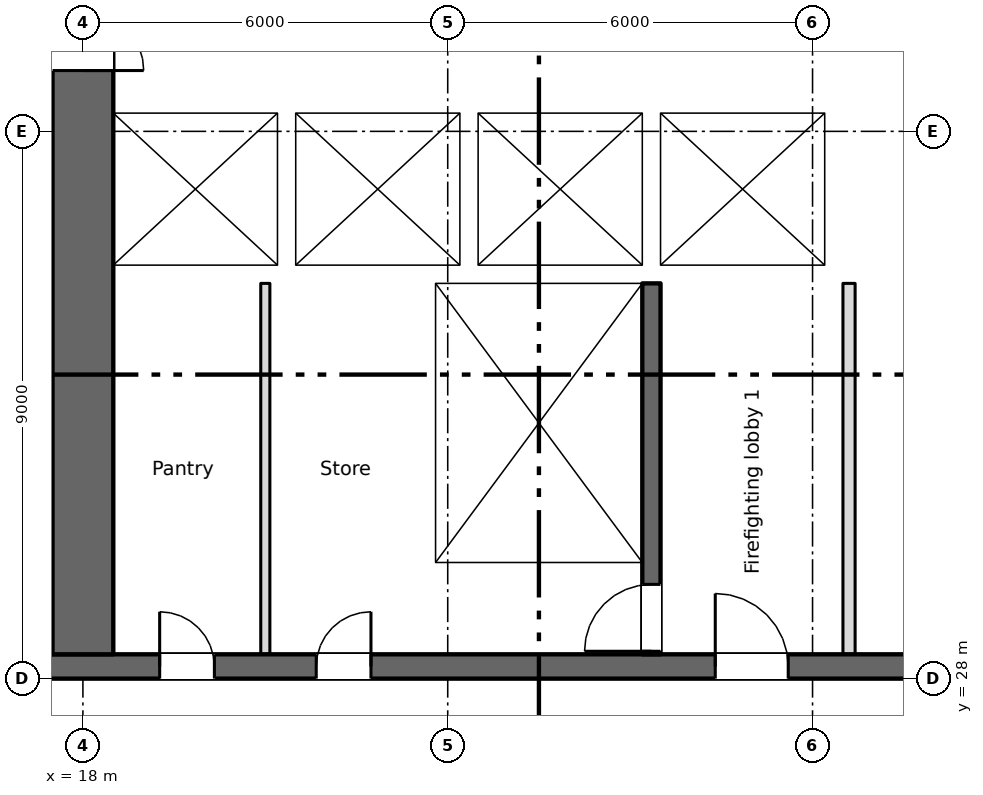
"""IFC4 building model, lengths in metres.
Left out: names, types, materials, properties, quantities, classifications, styles, units other than length and angle.
Written with IfcOpenShell. Run it as: python <this file> out.ifc"""

import sys

from ifc_helpers import new_model, si_unit, direction, frame, frame_2d, origin, place, context, subcontext, project, spatial, rectangle, extrude, element, fill, save


model = new_model("IFC4")
c1 = context("Model", 3, precision=1e-05, world=origin(), true_north=direction((0.0, 1.0)))
c2 = subcontext(c1, "Body", "Model", "MODEL_VIEW")
j1 = project(units=[si_unit("LENGTHUNIT", "METRE"), si_unit("PLANEANGLEUNIT", "RADIAN")], contexts=[c1])
p1 = place(None, origin())
s1 = spatial("IfcSite", under=j1, at=p1, CompositionType="ELEMENT")
p2 = place(p1, origin())
s2 = spatial("IfcBuilding", under=s1, at=p2, CompositionType="ELEMENT")
p3 = place(p2, frame((0.0, 0.0, 22.5)))
s3 = spatial("IfcBuildingStorey", under=s2, at=p3, CompositionType="ELEMENT", Elevation=22.5)
p4 = place(p3, frame((6.7, 28.2, 0.0), z_axis=(0.0, 0.0, 1.0), x_axis=(1.0, 0.0, 0.0)))
e1 = element("IfcWall", 1, at=p4, inside=s3, PredefinedType="SHEAR", context=c2, shape_type="SweptSolid", body=[
    extrude(rectangle(XDim=57.8, YDim=0.4, at=frame_2d((28.9, 0.0))), origin(), (0.0, 0.0, 1.0), 3.35),
])
p5 = place(p4, frame((12.562, 0.0, 0.0)))
e2 = element("IfcOpeningElement", 2, at=p5, cuts=e1, PredefinedType="OPENING", context=c2, shape_type="SweptSolid", body=[
    extrude(rectangle(XDim=0.9, YDim=2.1, at=frame_2d((0.45, 1.05))), frame((0.0, 0.21, 0.0), z_axis=(0.0, -1.0, 0.0), x_axis=(1.0, 0.0, 0.0)), (0.0, 0.0, 1.0), 0.42),
])
p6 = place(p4, frame((15.137, 0.0, 0.0)))
e3 = element("IfcOpeningElement", 3, at=p6, cuts=e1, PredefinedType="OPENING", context=c2, shape_type="SweptSolid", body=[
    extrude(rectangle(XDim=0.9, YDim=2.1, at=frame_2d((0.45, 1.05))), frame((0.0, 0.21, 0.0), z_axis=(0.0, -1.0, 0.0), x_axis=(1.0, 0.0, 0.0)), (0.0, 0.0, 1.0), 0.42),
])
p7 = place(p4, frame((49.85, 0.0, 0.0)))
e4 = element("IfcOpeningElement", 4, at=p7, cuts=e1, PredefinedType="OPENING", context=c2, shape_type="SweptSolid", body=[
    extrude(rectangle(XDim=0.9, YDim=2.1, at=frame_2d((0.45, 1.05))), frame((0.0, 0.21, 0.0), z_axis=(0.0, -1.0, 0.0), x_axis=(1.0, 0.0, 0.0)), (0.0, 0.0, 1.0), 0.42),
])
p8 = place(p4, frame((0.562, 0.0, 0.0)))
e5 = element("IfcOpeningElement", 5, at=p8, cuts=e1, PredefinedType="OPENING", context=c2, shape_type="SweptSolid", body=[
    extrude(rectangle(XDim=0.9, YDim=2.1, at=frame_2d((0.45, 1.05))), frame((0.0, 0.21, 0.0), z_axis=(0.0, -1.0, 0.0), x_axis=(1.0, 0.0, 0.0)), (0.0, 0.0, 1.0), 0.42),
])
p9 = place(p4, frame((2.137, 0.0, 0.0)))
e6 = element("IfcOpeningElement", 6, at=p9, cuts=e1, PredefinedType="OPENING", context=c2, shape_type="SweptSolid", body=[
    extrude(rectangle(XDim=0.9, YDim=2.1, at=frame_2d((0.45, 1.05))), frame((0.0, 0.21, 0.0), z_axis=(0.0, -1.0, 0.0), x_axis=(1.0, 0.0, 0.0)), (0.0, 0.0, 1.0), 0.42),
])
p10 = place(p4, frame((4.7, 0.0, 0.0)))
e7 = element("IfcOpeningElement", 7, at=p10, cuts=e1, PredefinedType="OPENING", context=c2, shape_type="SweptSolid", body=[
    extrude(rectangle(XDim=1.2, YDim=2.1, at=frame_2d((0.6, 1.05))), frame((0.0, 0.21, 0.0), z_axis=(0.0, -1.0, 0.0), x_axis=(1.0, 0.0, 0.0)), (0.0, 0.0, 1.0), 0.42),
])
p11 = place(p4, frame((31.7, 0.0, 0.0)))
e8 = element("IfcOpeningElement", 8, at=p11, cuts=e1, PredefinedType="OPENING", context=c2, shape_type="SweptSolid", body=[
    extrude(rectangle(XDim=1.2, YDim=2.1, at=frame_2d((0.6, 1.05))), frame((0.0, 0.21, 0.0), z_axis=(0.0, -1.0, 0.0), x_axis=(1.0, 0.0, 0.0)), (0.0, 0.0, 1.0), 0.42),
])
p12 = place(p4, frame((55.2, 0.0, 0.0)))
e9 = element("IfcOpeningElement", 9, at=p12, cuts=e1, PredefinedType="OPENING", context=c2, shape_type="SweptSolid", body=[
    extrude(rectangle(XDim=1.2, YDim=2.1, at=frame_2d((0.6, 1.05))), frame((0.0, 0.21, 0.0), z_axis=(0.0, -1.0, 0.0), x_axis=(1.0, 0.0, 0.0)), (0.0, 0.0, 1.0), 0.42),
])
p13 = place(p4, frame((21.7, 0.0, 0.0)))
e10 = element("IfcOpeningElement", 10, at=p13, cuts=e1, PredefinedType="OPENING", context=c2, shape_type="SweptSolid", body=[
    extrude(rectangle(XDim=1.2, YDim=2.1, at=frame_2d((0.6, 1.05))), frame((0.0, 0.21, 0.0), z_axis=(0.0, -1.0, 0.0), x_axis=(1.0, 0.0, 0.0)), (0.0, 0.0, 1.0), 0.42),
])
p14 = place(p4, frame((41.7, 0.0, 0.0)))
e11 = element("IfcOpeningElement", 11, at=p14, cuts=e1, PredefinedType="OPENING", context=c2, shape_type="SweptSolid", body=[
    extrude(rectangle(XDim=1.2, YDim=2.1, at=frame_2d((0.6, 1.05))), frame((0.0, 0.21, 0.0), z_axis=(0.0, -1.0, 0.0), x_axis=(1.0, 0.0, 0.0)), (0.0, 0.0, 1.0), 0.42),
])
p15 = place(p4, frame((24.85, 0.0, 0.0)))
e12 = element("IfcOpeningElement", 12, at=p15, cuts=e1, PredefinedType="OPENING", context=c2, shape_type="SweptSolid", body=[
    extrude(rectangle(XDim=2.4, YDim=2.1, at=frame_2d((1.2, 1.05))), frame((0.0, 0.21, 0.0), z_axis=(0.0, -1.0, 0.0), x_axis=(1.0, 0.0, 0.0)), (0.0, 0.0, 1.0), 0.42),
])
p16 = place(p4, frame((37.35, 0.0, 0.0)))
e13 = element("IfcOpeningElement", 13, at=p16, cuts=e1, PredefinedType="OPENING", context=c2, shape_type="SweptSolid", body=[
    extrude(rectangle(XDim=2.4, YDim=2.1, at=frame_2d((1.2, 1.05))), frame((0.0, 0.21, 0.0), z_axis=(0.0, -1.0, 0.0), x_axis=(1.0, 0.0, 0.0)), (0.0, 0.0, 1.0), 0.42),
])
p17 = place(p4, frame((7.85, 0.0, 0.0)))
e14 = element("IfcOpeningElement", 14, at=p17, cuts=e1, PredefinedType="OPENING", context=c2, shape_type="SweptSolid", body=[
    extrude(rectangle(XDim=2.4, YDim=2.1, at=frame_2d((1.2, 1.05))), frame((0.0, 0.21, 0.0), z_axis=(0.0, -1.0, 0.0), x_axis=(1.0, 0.0, 0.0)), (0.0, 0.0, 1.0), 0.42),
])
p18 = place(p4, frame((28.85, 0.0, 0.0)))
e15 = element("IfcOpeningElement", 15, at=p18, cuts=e1, PredefinedType="OPENING", context=c2, shape_type="SweptSolid", body=[
    extrude(rectangle(XDim=0.9, YDim=2.1, at=frame_2d((0.45, 1.05))), frame((0.0, 0.21, 0.0), z_axis=(0.0, -1.0, 0.0), x_axis=(1.0, 0.0, 0.0)), (0.0, 0.0, 1.0), 0.42),
])
p19 = place(p4, frame((34.85, 0.0, 0.0)))
e16 = element("IfcOpeningElement", 16, at=p19, cuts=e1, PredefinedType="OPENING", context=c2, shape_type="SweptSolid", body=[
    extrude(rectangle(XDim=0.9, YDim=2.1, at=frame_2d((0.45, 1.05))), frame((0.0, 0.21, 0.0), z_axis=(0.0, -1.0, 0.0), x_axis=(1.0, 0.0, 0.0)), (0.0, 0.0, 1.0), 0.42),
])
p20 = place(p3, frame((18.0, 28.4, 0.0), z_axis=(0.0, 0.0, 1.0), x_axis=(0.0, 1.0, 0.0)))
e17 = element("IfcWall", 17, at=p20, inside=s3, PredefinedType="SHEAR", context=c2, shape_type="SweptSolid", body=[
    extrude(rectangle(XDim=16.6, YDim=1.0, at=frame_2d((8.3, 0.0))), origin(), (0.0, 0.0, 1.0), 3.35),
])
p21 = place(p20, frame((9.6, 0.0, 0.0)))
e18 = element("IfcOpeningElement", 18, at=p21, cuts=e17, PredefinedType="OPENING", context=c2, shape_type="SweptSolid", body=[
    extrude(rectangle(XDim=2.0, YDim=2.1, at=frame_2d((1.0, 1.05))), frame((0.0, 0.51, 0.0), z_axis=(0.0, -1.0, 0.0), x_axis=(1.0, 0.0, 0.0)), (0.0, 0.0, 1.0), 1.02),
])
p22 = place(p20, frame((15.25, 0.0, 0.0)))
e19 = element("IfcOpeningElement", 19, at=p22, cuts=e17, PredefinedType="OPENING", context=c2, shape_type="SweptSolid", body=[
    extrude(rectangle(XDim=1.2, YDim=2.1, at=frame_2d((0.6, 1.05))), frame((0.0, 0.51, 0.0), z_axis=(0.0, -1.0, 0.0), x_axis=(1.0, 0.0, 0.0)), (0.0, 0.0, 1.0), 1.02),
])
p23 = place(p3, frame((23.65, 28.4, 0.0), z_axis=(0.0, 0.0, 1.0), x_axis=(0.0, 1.0, 0.0)))
e20 = element("IfcWall", 20, at=p23, inside=s3, PredefinedType="SHEAR", context=c2, shape_type="SweptSolid", body=[
    extrude(rectangle(XDim=6.1, YDim=0.3, at=frame_2d((3.05, 0.0))), origin(), (0.0, 0.0, 1.0), 3.35),
])
p24 = place(p3, frame((27.35, 28.4, 0.0), z_axis=(0.0, 0.0, 1.0), x_axis=(0.0, 1.0, 0.0)))
e21 = element("IfcWall", 21, at=p24, inside=s3, PredefinedType="SHEAR", context=c2, shape_type="SweptSolid", body=[
    extrude(rectangle(XDim=6.1, YDim=0.3, at=frame_2d((3.05, 0.0))), origin(), (0.0, 0.0, 1.0), 3.35),
])
p25 = place(p24, frame((0.05, 0.0, 0.0)))
e22 = element("IfcOpeningElement", 22, at=p25, cuts=e21, PredefinedType="OPENING", context=c2, shape_type="SweptSolid", body=[
    extrude(rectangle(XDim=1.1, YDim=2.1, at=frame_2d((0.55, 1.05))), frame((0.0, 0.16, 0.0), z_axis=(0.0, -1.0, 0.0), x_axis=(1.0, 0.0, 0.0)), (0.0, 0.0, 1.0), 0.32),
])
p26 = place(p3, frame((18.5, 34.65, 0.0), z_axis=(0.0, 0.0, 1.0), x_axis=(1.0, 0.0, 0.0)))
e23 = element("IfcWall", 23, at=p26, inside=s3, PredefinedType="SHEAR", context=c2, shape_type="SweptSolid", body=[
    extrude(rectangle(XDim=12.2, YDim=0.3, at=frame_2d((6.1, 0.0))), origin(), (0.0, 0.0, 1.0), 3.35),
])
p27 = place(p26, frame((9.8, 0.0, 0.0)))
e24 = element("IfcOpeningElement", 24, at=p27, cuts=e23, PredefinedType="OPENING", context=c2, shape_type="SweptSolid", body=[
    extrude(rectangle(XDim=1.1, YDim=2.1, at=frame_2d((0.55, 1.05))), frame((0.0, 0.16, 0.0), z_axis=(0.0, -1.0, 0.0), x_axis=(1.0, 0.0, 0.0)), (0.0, 0.0, 1.0), 0.32),
])
p28 = place(p3, frame((18.5, 37.45, 0.0), z_axis=(0.0, 0.0, 1.0), x_axis=(1.0, 0.0, 0.0)))
e25 = element("IfcWall", 25, at=p28, inside=s3, PredefinedType="SHEAR", context=c2, shape_type="SweptSolid", body=[
    extrude(rectangle(XDim=12.2, YDim=0.3, at=frame_2d((6.1, 0.0))), origin(), (0.0, 0.0, 1.0), 3.35),
])
p29 = place(p28, frame((0.8, 0.0, 0.0)))
e26 = element("IfcOpeningElement", 26, at=p29, cuts=e25, PredefinedType="OPENING", context=c2, shape_type="SweptSolid", body=[
    extrude(rectangle(XDim=1.1, YDim=2.1, at=frame_2d((0.55, 1.05))), frame((0.0, 0.16, 0.0), z_axis=(0.0, -1.0, 0.0), x_axis=(1.0, 0.0, 0.0)), (0.0, 0.0, 1.0), 0.32),
])
p30 = place(p28, frame((3.8, 0.0, 0.0)))
e27 = element("IfcOpeningElement", 27, at=p30, cuts=e25, PredefinedType="OPENING", context=c2, shape_type="SweptSolid", body=[
    extrude(rectangle(XDim=1.1, YDim=2.1, at=frame_2d((0.55, 1.05))), frame((0.0, 0.16, 0.0), z_axis=(0.0, -1.0, 0.0), x_axis=(1.0, 0.0, 0.0)), (0.0, 0.0, 1.0), 0.32),
])
p31 = place(p28, frame((6.8, 0.0, 0.0)))
e28 = element("IfcOpeningElement", 28, at=p31, cuts=e25, PredefinedType="OPENING", context=c2, shape_type="SweptSolid", body=[
    extrude(rectangle(XDim=1.1, YDim=2.1, at=frame_2d((0.55, 1.05))), frame((0.0, 0.16, 0.0), z_axis=(0.0, -1.0, 0.0), x_axis=(1.0, 0.0, 0.0)), (0.0, 0.0, 1.0), 0.32),
])
p32 = place(p3, frame((27.35, 34.8, 0.0), z_axis=(0.0, 0.0, 1.0), x_axis=(0.0, 1.0, 0.0)))
e29 = element("IfcWall", 29, at=p32, inside=s3, PredefinedType="SHEAR", context=c2, shape_type="SweptSolid", body=[
    extrude(rectangle(XDim=2.5, YDim=0.3, at=frame_2d((1.25, 0.0))), origin(), (0.0, 0.0, 1.0), 3.35),
])
p33 = place(p3, frame((30.45, 34.8, 0.0), z_axis=(0.0, 0.0, 1.0), x_axis=(0.0, 1.0, 0.0)))
e30 = element("IfcWall", 30, at=p33, inside=s3, PredefinedType="SHEAR", context=c2, shape_type="SweptSolid", body=[
    extrude(rectangle(XDim=2.5, YDim=0.5, at=frame_2d((1.25, 0.0))), origin(), (0.0, 0.0, 1.0), 3.35),
])
for number, where, z_axis, x_axis in (
    (31, (21.35, 34.8, 0.0), (0.0, 0.0, 1.0), (0.0, 1.0, 0.0)),
    (32, (24.35, 34.8, 0.0), (0.0, 0.0, 1.0), (0.0, 1.0, 0.0)),
):
    element("IfcWall", number, at=place(p3, frame(where, z_axis=z_axis, x_axis=x_axis)), inside=s3, PredefinedType="SHEAR", context=c2, shape_type="SweptSolid", body=[
        extrude(rectangle(XDim=2.5, YDim=0.3, at=frame_2d((1.25, 0.0))), origin(), (0.0, 0.0, 1.0), 3.35),
    ])
p34 = place(p3, frame((30.6, 28.4, 0.0), z_axis=(0.0, 0.0, 1.0), x_axis=(0.0, 1.0, 0.0)))
e33 = element("IfcWall", 33, at=p34, inside=s3, PredefinedType="PARTITIONING", context=c2, shape_type="SweptSolid", body=[
    extrude(rectangle(XDim=6.1, YDim=0.2, at=frame_2d((3.05, 0.0))), origin(), (0.0, 0.0, 1.0), 3.35),
])
p35 = place(p3, frame((21.0, 28.4, 0.0), z_axis=(0.0, 0.0, 1.0), x_axis=(0.0, 1.0, 0.0)))
e34 = element("IfcWall", 34, at=p35, inside=s3, PredefinedType="PARTITIONING", context=c2, shape_type="SweptSolid", body=[
    extrude(rectangle(XDim=6.1, YDim=0.15, at=frame_2d((3.05, 0.0))), origin(), (0.0, 0.0, 1.0), 3.35),
])
p36 = place(p5, origin())
e35 = element("IfcDoor", 35, at=p36, inside=s3, OperationType="SINGLE_SWING_LEFT", PredefinedType="DOOR", context=c2, shape_type="SweptSolid", body=[
    extrude(rectangle(XDim=0.9, YDim=2.1, at=frame_2d((0.45, 1.05))), frame((0.0, 0.025, 0.0), z_axis=(0.0, -1.0, 0.0), x_axis=(1.0, 0.0, 0.0)), (0.0, 0.0, 1.0), 0.05),
])
fill(e2, e35)
p37 = place(p6, origin())
e36 = element("IfcDoor", 36, at=p37, inside=s3, OperationType="SINGLE_SWING_RIGHT", PredefinedType="DOOR", context=c2, shape_type="SweptSolid", body=[
    extrude(rectangle(XDim=0.9, YDim=2.1, at=frame_2d((0.45, 1.05))), frame((0.0, 0.025, 0.0), z_axis=(0.0, -1.0, 0.0), x_axis=(1.0, 0.0, 0.0)), (0.0, 0.0, 1.0), 0.05),
])
fill(e3, e36)
p38 = place(p29, origin())
e37 = element("IfcDoor", 37, at=p38, inside=s3, OperationType="SLIDING_TO_LEFT", PredefinedType="DOOR", context=c2, shape_type="SweptSolid", body=[
    extrude(rectangle(XDim=1.1, YDim=2.1, at=frame_2d((0.55, 1.05))), frame((0.0, 0.025, 0.0), z_axis=(0.0, -1.0, 0.0), x_axis=(1.0, 0.0, 0.0)), (0.0, 0.0, 1.0), 0.05),
])
fill(e26, e37)
p39 = place(p30, origin())
e38 = element("IfcDoor", 38, at=p39, inside=s3, OperationType="SLIDING_TO_LEFT", PredefinedType="DOOR", context=c2, shape_type="SweptSolid", body=[
    extrude(rectangle(XDim=1.1, YDim=2.1, at=frame_2d((0.55, 1.05))), frame((0.0, 0.025, 0.0), z_axis=(0.0, -1.0, 0.0), x_axis=(1.0, 0.0, 0.0)), (0.0, 0.0, 1.0), 0.05),
])
fill(e27, e38)
p40 = place(p31, origin())
e39 = element("IfcDoor", 39, at=p40, inside=s3, OperationType="SLIDING_TO_LEFT", PredefinedType="DOOR", context=c2, shape_type="SweptSolid", body=[
    extrude(rectangle(XDim=1.1, YDim=2.1, at=frame_2d((0.55, 1.05))), frame((0.0, 0.025, 0.0), z_axis=(0.0, -1.0, 0.0), x_axis=(1.0, 0.0, 0.0)), (0.0, 0.0, 1.0), 0.05),
])
fill(e28, e39)
p41 = place(p27, origin())
e40 = element("IfcDoor", 40, at=p41, inside=s3, OperationType="SLIDING_TO_LEFT", PredefinedType="DOOR", context=c2, shape_type="SweptSolid", body=[
    extrude(rectangle(XDim=1.1, YDim=2.1, at=frame_2d((0.55, 1.05))), frame((0.0, 0.025, 0.0), z_axis=(0.0, -1.0, 0.0), x_axis=(1.0, 0.0, 0.0)), (0.0, 0.0, 1.0), 0.05),
])
fill(e24, e40)
p42 = place(p25, origin())
e41 = element("IfcDoor", 41, at=p42, inside=s3, OperationType="SINGLE_SWING_LEFT", PredefinedType="DOOR", context=c2, shape_type="SweptSolid", body=[
    extrude(rectangle(XDim=1.1, YDim=2.1, at=frame_2d((0.55, 1.05))), frame((0.0, 0.025, 0.0), z_axis=(0.0, -1.0, 0.0), x_axis=(1.0, 0.0, 0.0)), (0.0, 0.0, 1.0), 0.05),
])
fill(e22, e41)
p43 = place(p13, origin())
e42 = element("IfcDoor", 42, at=p43, inside=s3, OperationType="SINGLE_SWING_LEFT", PredefinedType="DOOR", context=c2, shape_type="SweptSolid", body=[
    extrude(rectangle(XDim=1.2, YDim=2.1, at=frame_2d((0.6, 1.05))), frame((0.0, 0.025, 0.0), z_axis=(0.0, -1.0, 0.0), x_axis=(1.0, 0.0, 0.0)), (0.0, 0.0, 1.0), 0.05),
])
fill(e10, e42)
p44 = place(p21, origin())
e43 = element("IfcDoor", 43, at=p44, inside=s3, OperationType="DOUBLE_DOOR_SINGLE_SWING", PredefinedType="DOOR", context=c2, shape_type="SweptSolid", body=[
    extrude(rectangle(XDim=2.0, YDim=2.1, at=frame_2d((1.0, 1.05))), frame((0.0, 0.025, 0.0), z_axis=(0.0, -1.0, 0.0), x_axis=(1.0, 0.0, 0.0)), (0.0, 0.0, 1.0), 0.05),
])
fill(e18, e43)
save(model, sys.argv[1])
